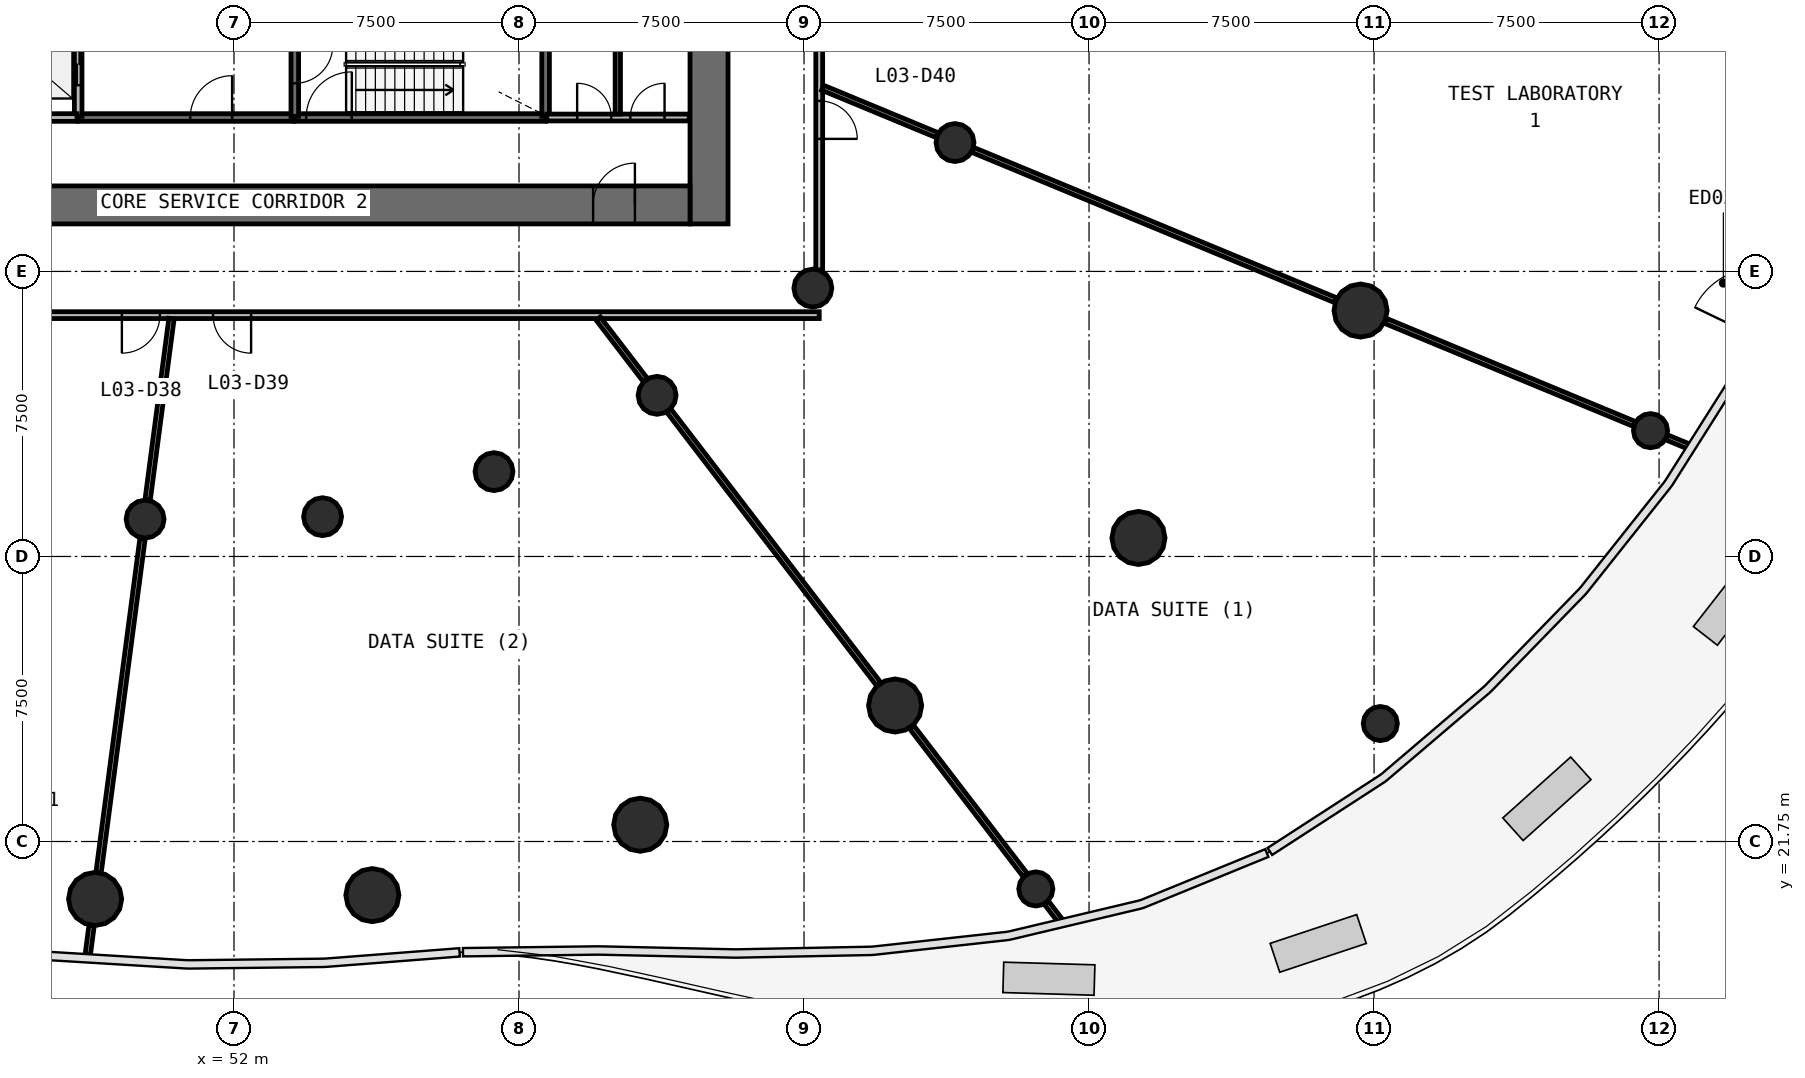
"""IFC4 building model, lengths in metres.
Left out: names, types, materials, properties, quantities, classifications, styles, units other than length and angle.
Written with IfcOpenShell. Run it as: python <this file> out.ifc"""

import sys

from ifc_helpers import new_model, si_unit, direction, frame, frame_2d, origin, origin_2d, place, context, subcontext, project, spatial, rectangle, circle, extrude, source, transform, mapped, element, fill, save


model = new_model("IFC4")
c1 = context("Model", 3, precision=1e-05, world=origin(), true_north=direction((0.0, 1.0)))
c2 = subcontext(c1, "Body", "Model", "MODEL_VIEW")
j1 = project(units=[si_unit("LENGTHUNIT", "METRE"), si_unit("PLANEANGLEUNIT", "RADIAN")], contexts=[c1])
p1 = place(None, origin())
s1 = spatial("IfcSite", under=j1, at=p1, CompositionType="ELEMENT")
p2 = place(p1, origin())
s2 = spatial("IfcBuilding", under=s1, at=p2, CompositionType="ELEMENT")
p3 = place(p2, frame((0.0, 0.0, 13.8)))
s3 = spatial("IfcBuildingStorey", under=s2, at=p3, CompositionType="ELEMENT", Elevation=13.8)
p4 = place(p3, frame((64.5, 38.0, 0.0), z_axis=(0.0, 0.0, 1.0), x_axis=(0.0, 1.0, 0.0)))
e1 = element("IfcWall", 1, at=p4, inside=s3, PredefinedType="SHEAR", context=c2, shape_type="SweptSolid", body=[
    extrude(rectangle(XDim=20.0, YDim=1.0, at=frame_2d((10.0, 0.0))), origin(), (0.0, 0.0, 1.0), 4.4),
])
p5 = place(p4, frame((9.1, 0.0, 0.0)))
e2 = element("IfcOpeningElement", 2, at=p5, cuts=e1, PredefinedType="OPENING", context=c2, shape_type="SweptSolid", body=[
    extrude(rectangle(XDim=1.8, YDim=2.1, at=frame_2d((0.9, 1.05))), frame((0.0, 0.51, 0.0), z_axis=(0.0, -1.0, 0.0), x_axis=(1.0, 0.0, 0.0)), (0.0, 0.0, 1.0), 1.02),
])
p6 = place(p3, frame((40.0, 38.5, 0.0), z_axis=(0.0, 0.0, 1.0), x_axis=(1.0, 0.0, 0.0)))
e3 = element("IfcWall", 3, at=p6, inside=s3, PredefinedType="SHEAR", context=c2, shape_type="SweptSolid", body=[
    extrude(rectangle(XDim=24.0, YDim=1.0, at=frame_2d((12.0, 0.0))), origin(), (0.0, 0.0, 1.0), 4.4),
])
p7 = place(p6, frame((21.45, 0.0, 0.0)))
e4 = element("IfcOpeningElement", 4, at=p7, cuts=e3, PredefinedType="OPENING", context=c2, shape_type="SweptSolid", body=[
    extrude(rectangle(XDim=1.1, YDim=2.1, at=frame_2d((0.55, 1.05))), frame((0.0, 0.51, 0.0), z_axis=(0.0, -1.0, 0.0), x_axis=(1.0, 0.0, 0.0)), (0.0, 0.0, 1.0), 1.02),
])
p8 = place(p6, frame((1.95, 0.0, 0.0)))
e5 = element("IfcOpeningElement", 5, at=p8, cuts=e3, PredefinedType="OPENING", context=c2, shape_type="SweptSolid", body=[
    extrude(rectangle(XDim=1.1, YDim=2.1, at=frame_2d((0.55, 1.05))), frame((0.0, 0.51, 0.0), z_axis=(0.0, -1.0, 0.0), x_axis=(1.0, 0.0, 0.0)), (0.0, 0.0, 1.0), 1.02),
])
m1 = source(origin(), c2, "Body", "SweptSolid", [
    extrude(circle(Radius=0.7, at=origin_2d()), origin(), (0.0, 0.0, 1.0), 4.4),
])
for number, where, z_axis, x_axis in (
    (6, (48.345, 20.239, 0.0), (0.0, 0.0, 1.0), (1.0, 0.0, 0.0)),
    (7, (55.642, 20.339, 0.0), (0.0, 0.0, 1.0), (1.0, 0.0, 0.0)),
    (8, (62.69, 22.191, 0.0), (0.0, 0.0, 1.0), (1.0, 0.0, 0.0)),
    (9, (69.396, 25.328, 0.0), (0.0, 0.0, 1.0), (1.0, 0.0, 0.0)),
    (10, (75.801, 29.737, 0.0), (0.0, 0.0, 1.0), (1.0, 0.0, 0.0)),
    (11, (81.645, 35.721, 0.0), (0.0, 0.0, 1.0), (1.0, 0.0, 0.0)),
):
    element("IfcColumn", number, at=place(p3, frame(where, z_axis=z_axis, x_axis=x_axis)), inside=s3, PredefinedType="COLUMN", context=c2, shape_type="MappedRepresentation", body=[
        mapped(m1, transform((0.0, 0.0, 0.0), scale=1.0)),
    ])
m2 = source(origin(), c2, "Body", "SweptSolid", [
    extrude(circle(Radius=0.5, at=origin_2d()), origin(), (0.0, 0.0, 1.0), 4.4),
])
for number, where, z_axis, x_axis in (
    (12, (49.661, 30.233, 0.0), (0.0, 0.0, 1.0), (1.0, 0.0, 0.0)),
    (13, (54.331, 30.297, 0.0), (0.0, 0.0, 1.0), (1.0, 0.0, 0.0)),
    (14, (58.842, 31.482, 0.0), (0.0, 0.0, 1.0), (1.0, 0.0, 0.0)),
    (15, (63.134, 33.49, 0.0), (0.0, 0.0, 1.0), (1.0, 0.0, 0.0)),
    (16, (67.232, 36.312, 0.0), (0.0, 0.0, 1.0), (1.0, 0.0, 0.0)),
    (17, (70.972, 40.141, 0.0), (0.0, 0.0, 1.0), (1.0, 0.0, 0.0)),
):
    element("IfcColumn", number, at=place(p3, frame(where, z_axis=z_axis, x_axis=x_axis)), inside=s3, PredefinedType="COLUMN", context=c2, shape_type="MappedRepresentation", body=[
        mapped(m2, transform((0.0, 0.0, 0.0), scale=1.0)),
    ])
m3 = source(origin(), c2, "Body", "SweptSolid", [
    extrude(circle(Radius=0.45, at=origin_2d()), origin(), (0.0, 0.0, 1.0), 4.05),
])
for number, where, z_axis, x_axis in (
    (18, (73.1, 20.503, 0.0), (0.0, 0.0, 1.0), (1.0, 0.0, 0.0)),
    (19, (82.165, 24.854, 0.0), (0.0, 0.0, 1.0), (1.0, 0.0, 0.0)),
    (20, (89.275, 32.56, 0.0), (0.0, 0.0, 1.0), (1.0, 0.0, 0.0)),
):
    element("IfcColumn", number, at=place(p3, frame(where, z_axis=z_axis, x_axis=x_axis)), inside=s3, PredefinedType="COLUMN", context=c2, shape_type="MappedRepresentation", body=[
        mapped(m3, transform((0.0, 0.0, 0.0), scale=1.0)),
    ])
p9 = place(p3, frame((53.6, 40.8, 0.0), z_axis=(0.0, 0.0, 1.0), x_axis=(1.0, 0.0, 0.0)))
e21 = element("IfcWall", 21, at=p9, inside=s3, PredefinedType="SOLIDWALL", context=c2, shape_type="SweptSolid", body=[
    extrude(rectangle(XDim=6.6, YDim=0.2, at=frame_2d((3.3, 0.0))), origin(), (0.0, 0.0, 1.0), 4.05),
])
p10 = place(p9, frame((0.3, 0.0, 0.0)))
e22 = element("IfcOpeningElement", 22, at=p10, cuts=e21, PredefinedType="OPENING", context=c2, shape_type="SweptSolid", body=[
    extrude(rectangle(XDim=1.2, YDim=2.1, at=frame_2d((0.6, 1.05))), frame((0.0, 0.11, 0.0), z_axis=(0.0, -1.0, 0.0), x_axis=(1.0, 0.0, 0.0)), (0.0, 0.0, 1.0), 0.22),
])
p11 = place(p3, frame((47.9, 40.8, 0.0), z_axis=(0.0, 0.0, 1.0), x_axis=(1.0, 0.0, 0.0)))
e23 = element("IfcWall", 23, at=p11, inside=s3, PredefinedType="SOLIDWALL", context=c2, shape_type="SweptSolid", body=[
    extrude(rectangle(XDim=5.67, YDim=0.2, at=frame_2d((2.835, 0.0))), origin(), (0.0, 0.0, 1.0), 4.05),
])
p12 = place(p11, frame((2.95, 0.0, 0.0)))
e24 = element("IfcOpeningElement", 24, at=p12, cuts=e23, PredefinedType="OPENING", context=c2, shape_type="SweptSolid", body=[
    extrude(rectangle(XDim=1.1, YDim=2.1, at=frame_2d((0.55, 1.05))), frame((0.0, 0.11, 0.0), z_axis=(0.0, -1.0, 0.0), x_axis=(1.0, 0.0, 0.0)), (0.0, 0.0, 1.0), 0.22),
])
p13 = place(p3, frame((47.9, 40.83, 0.0), z_axis=(0.0, 0.0, 1.0), x_axis=(0.0, 1.0, 0.0)))
e25 = element("IfcWall", 25, at=p13, inside=s3, PredefinedType="SOLIDWALL", context=c2, shape_type="SweptSolid", body=[
    extrude(rectangle(XDim=2.77, YDim=0.2, at=frame_2d((1.385, 0.0))), origin(), (0.0, 0.0, 1.0), 4.05),
])
p14 = place(p13, frame((0.82, 0.0, 0.0)))
e26 = element("IfcOpeningElement", 26, at=p14, cuts=e25, PredefinedType="OPENING", context=c2, shape_type="SweptSolid", body=[
    extrude(rectangle(XDim=1.1, YDim=2.1, at=frame_2d((0.55, 1.05))), frame((0.0, 0.11, 0.0), z_axis=(0.0, -1.0, 0.0), x_axis=(1.0, 0.0, 0.0)), (0.0, 0.0, 1.0), 0.22),
])
p15 = place(p3, frame((60.2, 40.83, 0.0), z_axis=(0.0, 0.0, 1.0), x_axis=(0.0, 1.0, 0.0)))
e27 = element("IfcWall", 27, at=p15, inside=s3, PredefinedType="SOLIDWALL", context=c2, shape_type="SweptSolid", body=[
    extrude(rectangle(XDim=2.77, YDim=0.2, at=frame_2d((1.385, 0.0))), origin(), (0.0, 0.0, 1.0), 4.05),
])
p16 = place(p3, frame((53.6, 43.6, 0.0), z_axis=(0.0, 0.0, 1.0), x_axis=(0.0, -1.0, 0.0)))
e28 = element("IfcWall", 28, at=p16, inside=s3, PredefinedType="SOLIDWALL", context=c2, shape_type="SweptSolid", body=[
    extrude(rectangle(XDim=2.77, YDim=0.2, at=frame_2d((1.385, 0.0))), origin(), (0.0, 0.0, 1.0), 4.05),
])
p17 = place(p16, frame((0.9, 0.0, 0.0)))
e29 = element("IfcOpeningElement", 29, at=p17, cuts=e28, PredefinedType="OPENING", context=c2, shape_type="SweptSolid", body=[
    extrude(rectangle(XDim=1.0, YDim=2.1, at=frame_2d((0.5, 1.05))), frame((0.0, 0.11, 0.0), z_axis=(0.0, -1.0, 0.0), x_axis=(1.0, 0.0, 0.0)), (0.0, 0.0, 1.0), 0.22),
])
p18 = place(p3, frame((45.53, 40.8, 0.0), z_axis=(0.0, 0.0, 1.0), x_axis=(1.0, 0.0, 0.0)))
e30 = element("IfcWall", 30, at=p18, inside=s3, PredefinedType="SOLIDWALL", context=c2, shape_type="SweptSolid", body=[
    extrude(rectangle(XDim=2.34, YDim=0.2, at=frame_2d((1.17, 0.0))), origin(), (0.0, 0.0, 1.0), 4.05),
])
p19 = place(p3, frame((67.4, 35.6, 0.0), z_axis=(0.0, 0.0, 1.0), x_axis=(-1.0, 0.0, 0.0)))
e31 = element("IfcWall", 31, at=p19, inside=s3, PredefinedType="PARTITIONING", context=c2, shape_type="SweptSolid", body=[
    extrude(rectangle(XDim=30.8, YDim=0.18, at=frame_2d((15.4, 0.0))), origin(), (0.0, 0.0, 1.0), 3.25),
])
p20 = place(p19, frame((20.95, 0.0, 0.0)))
e32 = element("IfcOpeningElement", 32, at=p20, cuts=e31, PredefinedType="OPENING", context=c2, shape_type="SweptSolid", body=[
    extrude(rectangle(XDim=1.0, YDim=2.1, at=frame_2d((0.5, 1.05))), frame((0.0, 0.1, 0.0), z_axis=(0.0, -1.0, 0.0), x_axis=(1.0, 0.0, 0.0)), (0.0, 0.0, 1.0), 0.2),
])
p21 = place(p19, frame((17.35, 0.0, 0.0)))
e33 = element("IfcOpeningElement", 33, at=p21, cuts=e31, PredefinedType="OPENING", context=c2, shape_type="SweptSolid", body=[
    extrude(rectangle(XDim=1.0, YDim=2.1, at=frame_2d((0.5, 1.05))), frame((0.0, 0.1, 0.0), z_axis=(0.0, -1.0, 0.0), x_axis=(1.0, 0.0, 0.0)), (0.0, 0.0, 1.0), 0.2),
])
p22 = place(p19, frame((14.95, 0.0, 0.0)))
e34 = element("IfcOpeningElement", 34, at=p22, cuts=e31, PredefinedType="OPENING", context=c2, shape_type="SweptSolid", body=[
    extrude(rectangle(XDim=1.0, YDim=2.1, at=frame_2d((0.5, 1.05))), frame((0.0, 0.1, 0.0), z_axis=(0.0, -1.0, 0.0), x_axis=(1.0, 0.0, 0.0)), (0.0, 0.0, 1.0), 0.2),
])
p23 = place(p3, frame((67.4, 60.37, 0.0), z_axis=(0.0, 0.0, 1.0), x_axis=(0.0, -1.0, 0.0)))
e35 = element("IfcWall", 35, at=p23, inside=s3, PredefinedType="PARTITIONING", context=c2, shape_type="SweptSolid", body=[
    extrude(rectangle(XDim=23.583, YDim=0.18, at=frame_2d((11.791, 0.0))), origin(), (0.0, 0.0, 1.0), 3.25),
])
p24 = place(p23, frame((11.333, 0.0, 0.0)))
e36 = element("IfcOpeningElement", 36, at=p24, cuts=e35, PredefinedType="OPENING", context=c2, shape_type="SweptSolid", body=[
    extrude(rectangle(XDim=1.0, YDim=2.1, at=frame_2d((0.5, 1.05))), frame((0.0, 0.1, 0.0), z_axis=(0.0, -1.0, 0.0), x_axis=(1.0, 0.0, 0.0)), (0.0, 0.0, 1.0), 0.2),
])
p25 = place(p23, frame((9.133, 0.0, 0.0)))
e37 = element("IfcOpeningElement", 37, at=p25, cuts=e35, PredefinedType="OPENING", context=c2, shape_type="SweptSolid", body=[
    extrude(rectangle(XDim=1.0, YDim=2.1, at=frame_2d((0.5, 1.05))), frame((0.0, 0.1, 0.0), z_axis=(0.0, -1.0, 0.0), x_axis=(1.0, 0.0, 0.0)), (0.0, 0.0, 1.0), 0.2),
])
p26 = place(p23, frame((19.133, 0.0, 0.0)))
e38 = element("IfcOpeningElement", 38, at=p26, cuts=e35, PredefinedType="OPENING", context=c2, shape_type="SweptSolid", body=[
    extrude(rectangle(XDim=1.0, YDim=2.1, at=frame_2d((0.5, 1.05))), frame((0.0, 0.1, 0.0), z_axis=(0.0, -1.0, 0.0), x_axis=(1.0, 0.0, 0.0)), (0.0, 0.0, 1.0), 0.2),
])
p27 = place(p3, frame((60.23, 40.8, 0.0), z_axis=(0.0, 0.0, 1.0), x_axis=(1.0, 0.0, 0.0)))
e39 = element("IfcWall", 39, at=p27, inside=s3, PredefinedType="PARTITIONING", context=c2, shape_type="SweptSolid", body=[
    extrude(rectangle(XDim=3.75, YDim=0.18, at=frame_2d((1.875, 0.0))), origin(), (0.0, 0.0, 1.0), 4.05),
])
p28 = place(p27, frame((0.8, 0.0, 0.0)))
e40 = element("IfcOpeningElement", 40, at=p28, cuts=e39, PredefinedType="OPENING", context=c2, shape_type="SweptSolid", body=[
    extrude(rectangle(XDim=0.9, YDim=2.1, at=frame_2d((0.45, 1.05))), frame((0.0, 0.1, 0.0), z_axis=(0.0, -1.0, 0.0), x_axis=(1.0, 0.0, 0.0)), (0.0, 0.0, 1.0), 0.2),
])
p29 = place(p27, frame((2.2, 0.0, 0.0)))
e41 = element("IfcOpeningElement", 41, at=p29, cuts=e39, PredefinedType="OPENING", context=c2, shape_type="SweptSolid", body=[
    extrude(rectangle(XDim=0.9, YDim=2.1, at=frame_2d((0.45, 1.05))), frame((0.0, 0.1, 0.0), z_axis=(0.0, -1.0, 0.0), x_axis=(1.0, 0.0, 0.0)), (0.0, 0.0, 1.0), 0.2),
])
p30 = place(p3, frame((71.439, 39.948, 0.0), z_axis=(0.0, 0.0, 1.0), x_axis=(0.923874685699, -0.382695133396, 0.0)))
e42 = element("IfcWall", 42, at=p30, inside=s3, PredefinedType="PARTITIONING", context=c2, shape_type="SweptSolid", body=[
    extrude(rectangle(XDim=10.341, YDim=0.14, at=frame_2d((5.17, 0.0))), origin(), (0.0, 0.0, 1.0), 3.25),
])
p31 = place(p3, frame((63.441, 33.09, 0.0), z_axis=(0.0, 0.0, 1.0), x_axis=(0.608770769454, -0.793346173028, 0.0)))
e43 = element("IfcWall", 43, at=p31, inside=s3, PredefinedType="PARTITIONING", context=c2, shape_type="SweptSolid", body=[
    extrude(rectangle(XDim=9.079, YDim=0.14, at=frame_2d((4.54, 0.0))), origin(), (0.0, 0.0, 1.0), 3.25),
])
p32 = place(p3, frame((49.595, 29.733, 0.0), z_axis=(0.0, 0.0, 1.0), x_axis=(-0.130521426482, -0.991445488783, 0.0)))
e44 = element("IfcWall", 44, at=p32, inside=s3, PredefinedType="PARTITIONING", context=c2, shape_type="SweptSolid", body=[
    extrude(rectangle(XDim=8.872, YDim=0.14, at=frame_2d((4.436, 0.0))), origin(), (0.0, 0.0, 1.0), 3.25),
])
p33 = place(p3, frame((82.296, 35.451, 0.0), z_axis=(0.0, 0.0, 1.0), x_axis=(0.923879762642, -0.382682876779, 0.0)))
e45 = element("IfcWall", 45, at=p33, inside=s3, PredefinedType="PARTITIONING", context=c2, shape_type="SweptSolid", body=[
    extrude(rectangle(XDim=7.099, YDim=0.14, at=frame_2d((3.549, 0.0))), origin(), (0.0, 0.0, 1.0), 3.25),
])
p34 = place(p3, frame((69.825, 24.77, 0.0), z_axis=(0.0, 0.0, 1.0), x_axis=(0.608785402697, -0.793334944058, 0.0)))
e46 = element("IfcWall", 46, at=p34, inside=s3, PredefinedType="PARTITIONING", context=c2, shape_type="SweptSolid", body=[
    extrude(rectangle(XDim=4.924, YDim=0.14, at=frame_2d((2.462, 0.0))), origin(), (0.0, 0.0, 1.0), 3.25),
])
p35 = place(p3, frame((50.356, 35.51, 0.0), z_axis=(0.0, 0.0, 1.0), x_axis=(-0.130523979823, -0.991445152639, 0.0)))
e47 = element("IfcWall", 47, at=p35, inside=s3, PredefinedType="PARTITIONING", context=c2, shape_type="SweptSolid", body=[
    extrude(rectangle(XDim=4.818, YDim=0.14, at=frame_2d((2.409, 0.0))), origin(), (0.0, 0.0, 1.0), 3.25),
])
p36 = place(p3, frame((67.49, 41.584, 0.0), z_axis=(0.0, 0.0, 1.0), x_axis=(0.923911109142, -0.382607190737, 0.0)))
e48 = element("IfcWall", 48, at=p36, inside=s3, PredefinedType="PARTITIONING", context=c2, shape_type="SweptSolid", body=[
    extrude(rectangle(XDim=3.264, YDim=0.14, at=frame_2d((1.632, 0.0))), origin(), (0.0, 0.0, 1.0), 3.25),
])
p37 = place(p3, frame((62.1, 40.89, 0.0), z_axis=(0.0, 0.0, 1.0), x_axis=(0.0, 1.0, 0.0)))
e49 = element("IfcWall", 49, at=p37, inside=s3, PredefinedType="PARTITIONING", context=c2, shape_type="SweptSolid", body=[
    extrude(rectangle(XDim=2.71, YDim=0.14, at=frame_2d((1.355, 0.0))), origin(), (0.0, 0.0, 1.0), 3.25),
])
p38 = place(p3, frame((61.584, 35.51, 0.0), z_axis=(0.0, 0.0, 1.0), x_axis=(0.608727763541, -0.793379171578, 0.0)))
e50 = element("IfcWall", 50, at=p38, inside=s3, PredefinedType="PARTITIONING", context=c2, shape_type="SweptSolid", body=[
    extrude(rectangle(XDim=2.042, YDim=0.14, at=frame_2d((1.021, 0.0))), origin(), (0.0, 0.0, 1.0), 3.25),
])
p39 = place(p3, frame((48.253, 19.54, 0.0), z_axis=(0.0, 0.0, 1.0), x_axis=(-0.130598952658, -0.991435279564, 0.0)))
e51 = element("IfcWall", 51, at=p39, inside=s3, PredefinedType="PARTITIONING", context=c2, shape_type="SweptSolid", body=[
    extrude(rectangle(XDim=0.787, YDim=0.14, at=frame_2d((0.394, 0.0))), origin(), (0.0, 0.0, 1.0), 3.25),
])
p40 = place(p3, frame((89.695, 32.386, 0.0), z_axis=(0.0, 0.0, 1.0), x_axis=(0.923885189929, -0.382669773866, 0.0)))
e52 = element("IfcWall", 52, at=p40, inside=s3, PredefinedType="PARTITIONING", context=c2, shape_type="SweptSolid", body=[
    extrude(rectangle(XDim=0.633, YDim=0.14, at=frame_2d((0.316, 0.0))), origin(), (0.0, 0.0, 1.0), 3.25),
])
p41 = place(p3, frame((73.376, 20.142, 0.0), z_axis=(0.0, 0.0, 1.0), x_axis=(0.608538274095, -0.793524523226, 0.0)))
e53 = element("IfcWall", 53, at=p41, inside=s3, PredefinedType="PARTITIONING", context=c2, shape_type="SweptSolid", body=[
    extrude(rectangle(XDim=0.624, YDim=0.14, at=frame_2d((0.312, 0.0))), origin(), (0.0, 0.0, 1.0), 3.25),
])
m4 = source(origin(), c2, "Body", "SweptSolid", [
    extrude(rectangle(XDim=1.1, YDim=2.1, at=frame_2d((0.55, 1.05))), frame((0.0, 0.025, 0.0), z_axis=(0.0, -1.0, 0.0), x_axis=(1.0, 0.0, 0.0)), (0.0, 0.0, 1.0), 0.05),
])
p42 = place(p14, origin())
e54 = element("IfcDoor", 54, at=p42, inside=s3, OperationType="DOUBLE_DOOR_SLIDING", PredefinedType="USERDEFINED", context=c2, shape_type="MappedRepresentation", body=[
    mapped(m4, transform((0.0, 0.0, 0.0), scale=1.0)),
])
fill(e26, e54)
m5 = source(origin(), c2, "Body", "SweptSolid", [
    extrude(rectangle(XDim=1.2, YDim=2.1, at=frame_2d((0.6, 1.05))), frame((0.0, 0.025, 0.0), z_axis=(0.0, -1.0, 0.0), x_axis=(1.0, 0.0, 0.0)), (0.0, 0.0, 1.0), 0.05),
])
p43 = place(p10, origin())
e55 = element("IfcDoor", 55, at=p43, inside=s3, OperationType="SINGLE_SWING_RIGHT", PredefinedType="DOOR", context=c2, shape_type="MappedRepresentation", body=[
    mapped(m5, transform((0.0, 0.0, 0.0), scale=1.0)),
])
fill(e22, e55)
m6 = source(origin(), c2, "Body", "SweptSolid", [
    extrude(rectangle(XDim=1.0, YDim=2.1, at=frame_2d((0.5, 1.05))), frame((0.0, 0.025, 0.0), z_axis=(0.0, -1.0, 0.0), x_axis=(1.0, 0.0, 0.0)), (0.0, 0.0, 1.0), 0.05),
])
p44 = place(p17, origin())
e56 = element("IfcDoor", 56, at=p44, inside=s3, OperationType="SINGLE_SWING_LEFT", PredefinedType="DOOR", context=c2, shape_type="MappedRepresentation", body=[
    mapped(m6, transform((0.0, 0.0, 0.0), scale=1.0)),
])
fill(e29, e56)
m7 = source(origin(), c2, "Body", "SweptSolid", [
    extrude(rectangle(XDim=1.1, YDim=2.1, at=frame_2d((0.55, 1.05))), frame((0.0, 0.025, 0.0), z_axis=(0.0, -1.0, 0.0), x_axis=(1.0, 0.0, 0.0)), (0.0, 0.0, 1.0), 0.05),
])
p45 = place(p12, origin())
e57 = element("IfcDoor", 57, at=p45, inside=s3, OperationType="SINGLE_SWING_RIGHT", PredefinedType="DOOR", context=c2, shape_type="MappedRepresentation", body=[
    mapped(m7, transform((0.0, 0.0, 0.0), scale=1.0)),
])
fill(e24, e57)
m8 = source(origin(), c2, "Body", "SweptSolid", [
    extrude(rectangle(XDim=1.1, YDim=2.1, at=frame_2d((0.55, 1.05))), frame((0.0, 0.025, 0.0), z_axis=(0.0, -1.0, 0.0), x_axis=(1.0, 0.0, 0.0)), (0.0, 0.0, 1.0), 0.05),
])
p46 = place(p7, origin())
e58 = element("IfcDoor", 58, at=p46, inside=s3, OperationType="SINGLE_SWING_RIGHT", PredefinedType="DOOR", context=c2, shape_type="MappedRepresentation", body=[
    mapped(m8, transform((0.0, 0.0, 0.0), scale=1.0)),
])
fill(e4, e58)
m9 = source(origin(), c2, "Body", "SweptSolid", [
    extrude(rectangle(XDim=1.0, YDim=2.1, at=frame_2d((0.5, 1.05))), frame((0.0, 0.025, 0.0), z_axis=(0.0, -1.0, 0.0), x_axis=(1.0, 0.0, 0.0)), (0.0, 0.0, 1.0), 0.05),
])
p47 = place(p21, origin())
e59 = element("IfcDoor", 59, at=p47, inside=s3, OperationType="SINGLE_SWING_RIGHT", PredefinedType="DOOR", context=c2, shape_type="MappedRepresentation", body=[
    mapped(m9, transform((0.0, 0.0, 0.0), scale=1.0)),
])
fill(e33, e59)
p48 = place(p22, origin())
e60 = element("IfcDoor", 60, at=p48, inside=s3, OperationType="SINGLE_SWING_LEFT", PredefinedType="DOOR", context=c2, shape_type="MappedRepresentation", body=[
    mapped(m9, transform((0.0, 0.0, 0.0), scale=1.0)),
])
fill(e34, e60)
p49 = place(p26, origin())
e61 = element("IfcDoor", 61, at=p49, inside=s3, OperationType="SINGLE_SWING_RIGHT", PredefinedType="DOOR", context=c2, shape_type="MappedRepresentation", body=[
    mapped(m9, transform((0.0, 0.0, 0.0), scale=1.0)),
])
fill(e38, e61)
m10 = source(origin(), c2, "Body", "SweptSolid", [
    extrude(rectangle(XDim=0.9, YDim=2.1, at=frame_2d((0.45, 1.05))), frame((0.0, 0.025, 0.0), z_axis=(0.0, -1.0, 0.0), x_axis=(1.0, 0.0, 0.0)), (0.0, 0.0, 1.0), 0.05),
])
p50 = place(p28, origin())
e62 = element("IfcDoor", 62, at=p50, inside=s3, OperationType="SINGLE_SWING_LEFT", PredefinedType="DOOR", context=c2, shape_type="MappedRepresentation", body=[
    mapped(m10, transform((0.0, 0.0, 0.0), scale=1.0)),
])
fill(e40, e62)
p51 = place(p29, origin())
e63 = element("IfcDoor", 63, at=p51, inside=s3, OperationType="SINGLE_SWING_RIGHT", PredefinedType="DOOR", context=c2, shape_type="MappedRepresentation", body=[
    mapped(m10, transform((0.0, 0.0, 0.0), scale=1.0)),
])
fill(e41, e63)
save(model, sys.argv[1])
